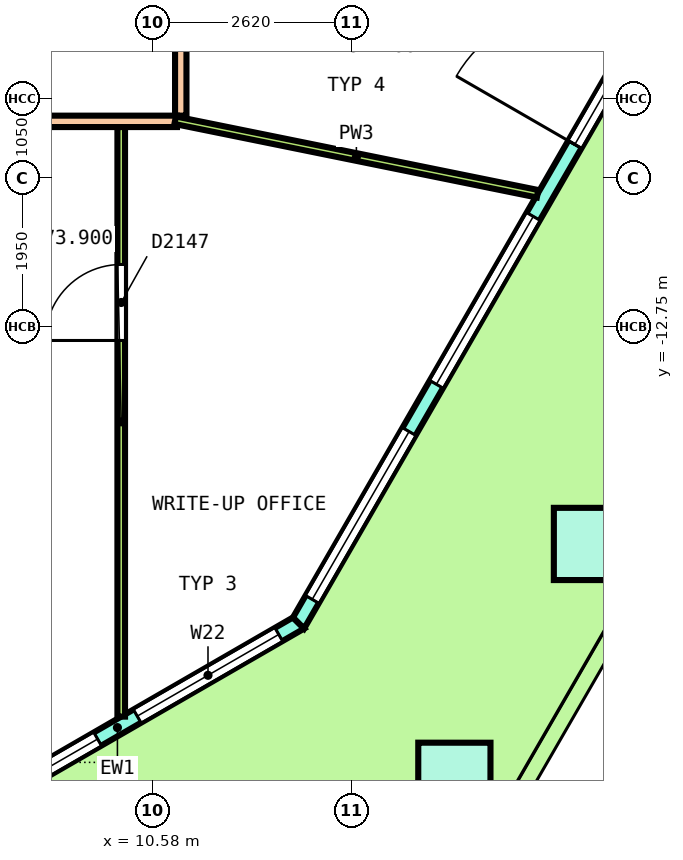
"""IFC4 building model, lengths in metres.
Left out: names, types, materials, properties, quantities, classifications, styles, units other than length and angle.
Written with IfcOpenShell. Run it as: python <this file> out.ifc"""

import sys

from ifc_helpers import new_model, si_unit, direction, frame, frame_2d, origin, origin_2d, place, context, subcontext, project, spatial, polyline, rectangle, outline, extrude, element, fill, save


model = new_model("IFC4")
c1 = context("Model", 3, precision=1e-05, world=origin(), true_north=direction((0.0, 1.0)))
c2 = subcontext(c1, "Body", "Model", "MODEL_VIEW")
j1 = project(units=[si_unit("LENGTHUNIT", "METRE"), si_unit("PLANEANGLEUNIT", "RADIAN")], contexts=[c1])
p1 = place(None, origin())
s1 = spatial("IfcSite", under=j1, at=p1, CompositionType="ELEMENT")
p2 = place(p1, origin())
s2 = spatial("IfcBuilding", under=s1, at=p2, CompositionType="ELEMENT")
p3 = place(p2, frame((0.0, 0.0, 271.0)))
s3 = spatial("IfcBuildingStorey", under=s2, at=p3, CompositionType="ELEMENT", Elevation=271.0)
p4 = place(p3, frame((14.55, -18.699, 0.0), z_axis=(-0.018115165867, -0.031417446337, 0.999342176049), x_axis=(0.49985680131, 0.865348463809, 0.036265884358)))
e1 = element("IfcColumn", 1, at=p4, inside=s3, PredefinedType="COLUMN", context=c2, shape_type="SweptSolid", body=[
    extrude(rectangle(XDim=0.95, YDim=0.95, at=origin_2d()), origin(), (0.0, 0.0, 1.0), 3.652),
])
p5 = place(p3, frame((16.333, -15.61, 0.0), z_axis=(-0.010900423214, -0.018858400897, 0.999762742599), x_axis=(0.500590318805, 0.865410234662, 0.021782067434)))
e2 = element("IfcColumn", 2, at=p5, inside=s3, PredefinedType="COLUMN", context=c2, shape_type="SweptSolid", body=[
    extrude(rectangle(XDim=0.95, YDim=0.95, at=origin_2d()), origin(), (0.0, 0.0, 1.0), 3.651),
])
p6 = place(p3, frame((7.734, -19.401, 0.0), z_axis=(0.0, 0.0, 1.0), x_axis=(0.866026017613, 0.499998936816, 0.0)))
e3 = element("IfcWall", 3, at=p6, inside=s3, PredefinedType="SOLIDWALL", context=c2, shape_type="SweptSolid", body=[
    extrude(outline(polyline([(-0.027, -0.1), (1.084, -0.1), (2.196, -0.1), (3.307, -0.1), (4.419, -0.1), (5.53, -0.1), (5.477, 0.1), (4.387, 0.1), (3.297, 0.1), (2.207, 0.1), (1.117, 0.1), (0.027, 0.1), (-0.027, -0.1)])), origin(), (0.0, 0.0, 1.0), 3.7),
])
p7 = place(p6, frame((0.301, 0.0, 0.1)))
e4 = element("IfcOpeningElement", 4, at=p7, cuts=e3, PredefinedType="OPENING", context=c2, shape_type="SweptSolid", body=[
    extrude(rectangle(XDim=2.15, YDim=2.75, at=frame_2d((1.075, 1.375))), frame((0.0, 0.11, 0.0), z_axis=(0.0, -1.0, 0.0), x_axis=(1.0, 0.0, 0.0)), (0.0, 0.0, 1.0), 0.22),
])
p8 = place(p6, frame((3.052, 0.0, 0.1)))
e5 = element("IfcOpeningElement", 5, at=p8, cuts=e3, PredefinedType="OPENING", context=c2, shape_type="SweptSolid", body=[
    extrude(rectangle(XDim=2.15, YDim=2.75, at=frame_2d((1.075, 1.375))), frame((0.0, 0.11, 0.0), z_axis=(0.0, -1.0, 0.0), x_axis=(1.0, 0.0, 0.0)), (0.0, 0.0, 1.0), 0.22),
])
p9 = place(p3, frame((12.5, -16.65, 0.0), z_axis=(0.0, 0.0, 1.0), x_axis=(0.50000098397, 0.866024835688, 0.0)))
e6 = element("IfcWall", 6, at=p9, inside=s3, PredefinedType="SOLIDWALL", context=c2, shape_type="SweptSolid", body=[
    extrude(outline(polyline([(-0.027, -0.1), (0.998, -0.1), (2.022, -0.1), (3.047, -0.1), (4.071, -0.1), (5.096, -0.1), (6.12, -0.1), (7.145, -0.1), (8.169, -0.1), (9.194, -0.1), (10.218, -0.1), (11.243, -0.1), (12.267, -0.1), (13.292, -0.1), (14.316, -0.1), (15.341, -0.1), (16.365, -0.1), (16.312, 0.1), (15.294, 0.1), (14.276, 0.1), (13.258, 0.1), (12.24, 0.1), (11.223, 0.1), (10.205, 0.1), (9.187, 0.1), (8.169, 0.1), (7.151, 0.1), (6.134, 0.1), (5.116, 0.1), (4.098, 0.1), (3.08, 0.1), (2.062, 0.1), (1.045, 0.1), (0.027, 0.1), (-0.027, -0.1)])), origin(), (0.0, 0.0, 1.0), 3.7),
])
p10 = place(p9, frame((0.359, 0.0, 0.1)))
e7 = element("IfcOpeningElement", 7, at=p10, cuts=e6, PredefinedType="OPENING", context=c2, shape_type="SweptSolid", body=[
    extrude(rectangle(XDim=2.55, YDim=2.75, at=frame_2d((1.275, 1.375))), frame((0.0, 0.11, 0.0), z_axis=(0.0, -1.0, 0.0), x_axis=(1.0, 0.0, 0.0)), (0.0, 0.0, 1.0), 0.22),
])
p11 = place(p9, frame((3.626, 0.0, 0.1)))
e8 = element("IfcOpeningElement", 8, at=p11, cuts=e6, PredefinedType="OPENING", context=c2, shape_type="SweptSolid", body=[
    extrude(rectangle(XDim=2.55, YDim=2.75, at=frame_2d((1.275, 1.375))), frame((0.0, 0.11, 0.0), z_axis=(0.0, -1.0, 0.0), x_axis=(1.0, 0.0, 0.0)), (0.0, 0.0, 1.0), 0.22),
])
p12 = place(p9, frame((7.269, 0.0, 0.0)))
e9 = element("IfcOpeningElement", 9, at=p12, cuts=e6, PredefinedType="OPENING", context=c2, shape_type="SweptSolid", body=[
    extrude(rectangle(XDim=1.8, YDim=2.4, at=frame_2d((0.9, 1.2))), frame((0.0, 0.11, 0.0), z_axis=(0.0, -1.0, 0.0), x_axis=(1.0, 0.0, 0.0)), (0.0, 0.0, 1.0), 0.22),
])
p13 = place(p9, frame((7.269, 0.0, 2.55)))
e10 = element("IfcOpeningElement", 10, at=p13, cuts=e6, PredefinedType="OPENING", context=c2, shape_type="SweptSolid", body=[
    extrude(rectangle(XDim=1.8, YDim=0.3, at=frame_2d((0.9, 0.15))), frame((0.0, 0.11, 0.0), z_axis=(0.0, -1.0, 0.0), x_axis=(1.0, 0.0, 0.0)), (0.0, 0.0, 1.0), 0.22),
])
p14 = place(p9, frame((10.162, 0.0, 0.1)))
e11 = element("IfcOpeningElement", 11, at=p14, cuts=e6, PredefinedType="OPENING", context=c2, shape_type="SweptSolid", body=[
    extrude(rectangle(XDim=2.55, YDim=2.75, at=frame_2d((1.275, 1.375))), frame((0.0, 0.11, 0.0), z_axis=(0.0, -1.0, 0.0), x_axis=(1.0, 0.0, 0.0)), (0.0, 0.0, 1.0), 0.22),
])
p15 = place(p9, frame((13.429, 0.0, 0.1)))
e12 = element("IfcOpeningElement", 12, at=p15, cuts=e6, PredefinedType="OPENING", context=c2, shape_type="SweptSolid", body=[
    extrude(rectangle(XDim=2.55, YDim=2.75, at=frame_2d((1.275, 1.375))), frame((0.0, 0.11, 0.0), z_axis=(0.0, -1.0, 0.0), x_axis=(1.0, 0.0, 0.0)), (0.0, 0.0, 1.0), 0.22),
])
p16 = place(p3, frame((10.95, -9.975, 0.0), z_axis=(0.0, 0.0, 1.0), x_axis=(0.0, 1.0, 0.0)))
e13 = element("IfcWall", 13, at=p16, inside=s3, PredefinedType="PARTITIONING", context=c2, shape_type="SweptSolid", body=[
    extrude(rectangle(XDim=17.15, YDim=0.15, at=frame_2d((8.575, 0.0))), origin(), (0.0, 0.0, 1.0), 2.9),
])
p17 = place(p16, frame((10.954, 0.0, 0.0)))
e14 = element("IfcOpeningElement", 14, at=p17, cuts=e13, PredefinedType="OPENING", context=c2, shape_type="SweptSolid", body=[
    extrude(rectangle(XDim=1.0, YDim=2.1, at=frame_2d((0.5, 1.05))), frame((0.0, 0.085, 0.0), z_axis=(0.0, -1.0, 0.0), x_axis=(1.0, 0.0, 0.0)), (0.0, 0.0, 1.0), 0.17),
])
p18 = place(p16, frame((14.096, 0.0, 0.0)))
e15 = element("IfcOpeningElement", 15, at=p18, cuts=e13, PredefinedType="OPENING", context=c2, shape_type="SweptSolid", body=[
    extrude(rectangle(XDim=1.0, YDim=2.1, at=frame_2d((0.5, 1.05))), frame((0.0, 0.085, 0.0), z_axis=(0.0, -1.0, 0.0), x_axis=(1.0, 0.0, 0.0)), (0.0, 0.0, 1.0), 0.17),
])
p19 = place(p16, frame((2.86, 0.0, 0.0)))
e16 = element("IfcOpeningElement", 16, at=p19, cuts=e13, PredefinedType="OPENING", context=c2, shape_type="SweptSolid", body=[
    extrude(rectangle(XDim=1.0, YDim=2.1, at=frame_2d((0.5, 1.05))), frame((0.0, 0.085, 0.0), z_axis=(0.0, -1.0, 0.0), x_axis=(1.0, 0.0, 0.0)), (0.0, 0.0, 1.0), 0.17),
])
p20 = place(p16, frame((5.357, 0.0, 0.0)))
e17 = element("IfcOpeningElement", 17, at=p20, cuts=e13, PredefinedType="OPENING", context=c2, shape_type="SweptSolid", body=[
    extrude(rectangle(XDim=1.0, YDim=2.1, at=frame_2d((0.5, 1.05))), frame((0.0, 0.085, 0.0), z_axis=(0.0, -1.0, 0.0), x_axis=(1.0, 0.0, 0.0)), (0.0, 0.0, 1.0), 0.17),
])
p21 = place(p16, frame((8.337, 0.0, 0.0)))
e18 = element("IfcOpeningElement", 18, at=p21, cuts=e13, PredefinedType="OPENING", context=c2, shape_type="SweptSolid", body=[
    extrude(rectangle(XDim=1.0, YDim=2.1, at=frame_2d((0.5, 1.05))), frame((0.0, 0.085, 0.0), z_axis=(0.0, -1.0, 0.0), x_axis=(1.0, 0.0, 0.0)), (0.0, 0.0, 1.0), 0.17),
])
p22 = place(p3, frame((-11.025, -10.05, 0.0), z_axis=(0.0, 0.0, 1.0), x_axis=(1.0, 0.0, 0.0)))
e19 = element("IfcWall", 19, at=p22, inside=s3, PredefinedType="PARTITIONING", context=c2, shape_type="SweptSolid", body=[
    extrude(rectangle(XDim=21.925, YDim=0.15, at=frame_2d((10.962, 0.0))), origin(), (0.0, 0.0, 1.0), 2.9),
])
p23 = place(p22, frame((6.209, 0.0, 0.0)))
e20 = element("IfcOpeningElement", 20, at=p23, cuts=e19, PredefinedType="OPENING", context=c2, shape_type="SweptSolid", body=[
    extrude(rectangle(XDim=1.2, YDim=2.1, at=frame_2d((0.6, 1.05))), frame((0.0, 0.085, 0.0), z_axis=(0.0, -1.0, 0.0), x_axis=(1.0, 0.0, 0.0)), (0.0, 0.0, 1.0), 0.17),
])
p24 = place(p22, frame((14.606, 0.0, 0.0)))
e21 = element("IfcOpeningElement", 21, at=p24, cuts=e19, PredefinedType="OPENING", context=c2, shape_type="SweptSolid", body=[
    extrude(rectangle(XDim=1.2, YDim=2.1, at=frame_2d((0.6, 1.05))), frame((0.0, 0.085, 0.0), z_axis=(0.0, -1.0, 0.0), x_axis=(1.0, 0.0, 0.0)), (0.0, 0.0, 1.0), 0.17),
])
p25 = place(p3, frame((10.167, -17.881, 0.0), z_axis=(0.0, 0.0, 1.0), x_axis=(0.0, 1.0, 0.0)))
e22 = element("IfcWall", 22, at=p25, inside=s3, PredefinedType="PARTITIONING", context=c2, shape_type="SweptSolid", body=[
    extrude(rectangle(XDim=7.756, YDim=0.1, at=frame_2d((3.878, 0.0))), origin(), (0.0, 0.0, 1.0), 2.9),
])
p26 = place(p25, frame((4.948, 0.0, 0.0)))
e23 = element("IfcOpeningElement", 23, at=p26, cuts=e22, PredefinedType="OPENING", context=c2, shape_type="SweptSolid", body=[
    extrude(rectangle(XDim=1.0, YDim=2.1, at=frame_2d((0.5, 1.05))), frame((0.0, 0.06, 0.0), z_axis=(0.0, -1.0, 0.0), x_axis=(1.0, 0.0, 0.0)), (0.0, 0.0, 1.0), 0.12),
])
p27 = place(p3, frame((10.876, -10.035, 0.0), z_axis=(0.0, 0.0, 1.0), x_axis=(0.980028746754, -0.198855866233, 0.0)))
e24 = element("IfcWall", 24, at=p27, inside=s3, PredefinedType="PARTITIONING", context=c2, shape_type="SweptSolid", body=[
    extrude(rectangle(XDim=4.865, YDim=0.1, at=frame_2d((2.433, 0.0))), origin(), (0.0, 0.0, 1.0), 2.9),
])
p28 = place(p7, origin())
e25 = element("IfcWindow", 25, at=p28, inside=s3, PartitioningType="SINGLE_PANEL", PredefinedType="WINDOW", context=c2, shape_type="SweptSolid", body=[
    extrude(rectangle(XDim=2.15, YDim=2.75, at=frame_2d((1.075, 1.375))), frame((0.0, 0.03, 0.0), z_axis=(0.0, -1.0, 0.0), x_axis=(1.0, 0.0, 0.0)), (0.0, 0.0, 1.0), 0.06),
])
fill(e4, e25)
p29 = place(p8, origin())
e26 = element("IfcWindow", 26, at=p29, inside=s3, PartitioningType="SINGLE_PANEL", PredefinedType="WINDOW", context=c2, shape_type="SweptSolid", body=[
    extrude(rectangle(XDim=2.15, YDim=2.75, at=frame_2d((1.075, 1.375))), frame((0.0, 0.03, 0.0), z_axis=(0.0, -1.0, 0.0), x_axis=(1.0, 0.0, 0.0)), (0.0, 0.0, 1.0), 0.06),
])
fill(e5, e26)
p30 = place(p10, origin())
e27 = element("IfcWindow", 27, at=p30, inside=s3, PartitioningType="SINGLE_PANEL", PredefinedType="WINDOW", context=c2, shape_type="SweptSolid", body=[
    extrude(rectangle(XDim=2.55, YDim=2.75, at=frame_2d((1.275, 1.375))), frame((0.0, 0.03, 0.0), z_axis=(0.0, -1.0, 0.0), x_axis=(1.0, 0.0, 0.0)), (0.0, 0.0, 1.0), 0.06),
])
fill(e7, e27)
p31 = place(p11, origin())
e28 = element("IfcWindow", 28, at=p31, inside=s3, PartitioningType="SINGLE_PANEL", PredefinedType="WINDOW", context=c2, shape_type="SweptSolid", body=[
    extrude(rectangle(XDim=2.55, YDim=2.75, at=frame_2d((1.275, 1.375))), frame((0.0, 0.03, 0.0), z_axis=(0.0, -1.0, 0.0), x_axis=(1.0, 0.0, 0.0)), (0.0, 0.0, 1.0), 0.06),
])
fill(e8, e28)
p32 = place(p12, origin())
e29 = element("IfcDoor", 29, at=p32, inside=s3, OperationType="DOUBLE_DOOR_SINGLE_SWING", PredefinedType="DOOR", context=c2, shape_type="SweptSolid", body=[
    extrude(rectangle(XDim=1.8, YDim=2.4, at=frame_2d((0.9, 1.2))), frame((0.0, 0.025, 0.0), z_axis=(0.0, -1.0, 0.0), x_axis=(1.0, 0.0, 0.0)), (0.0, 0.0, 1.0), 0.05),
])
fill(e9, e29)
p33 = place(p13, origin())
e30 = element("IfcWindow", 30, at=p33, inside=s3, PartitioningType="SINGLE_PANEL", PredefinedType="WINDOW", context=c2, shape_type="SweptSolid", body=[
    extrude(rectangle(XDim=1.8, YDim=0.3, at=frame_2d((0.9, 0.15))), frame((0.0, 0.03, 0.0), z_axis=(0.0, -1.0, 0.0), x_axis=(1.0, 0.0, 0.0)), (0.0, 0.0, 1.0), 0.06),
])
fill(e10, e30)
p34 = place(p26, origin())
e31 = element("IfcDoor", 31, at=p34, inside=s3, OperationType="SINGLE_SWING_RIGHT", PredefinedType="DOOR", context=c2, shape_type="SweptSolid", body=[
    extrude(rectangle(XDim=1.0, YDim=2.1, at=frame_2d((0.5, 1.05))), frame((0.0, 0.025, 0.0), z_axis=(0.0, -1.0, 0.0), x_axis=(1.0, 0.0, 0.0)), (0.0, 0.0, 1.0), 0.05),
])
fill(e23, e31)
save(model, sys.argv[1])
